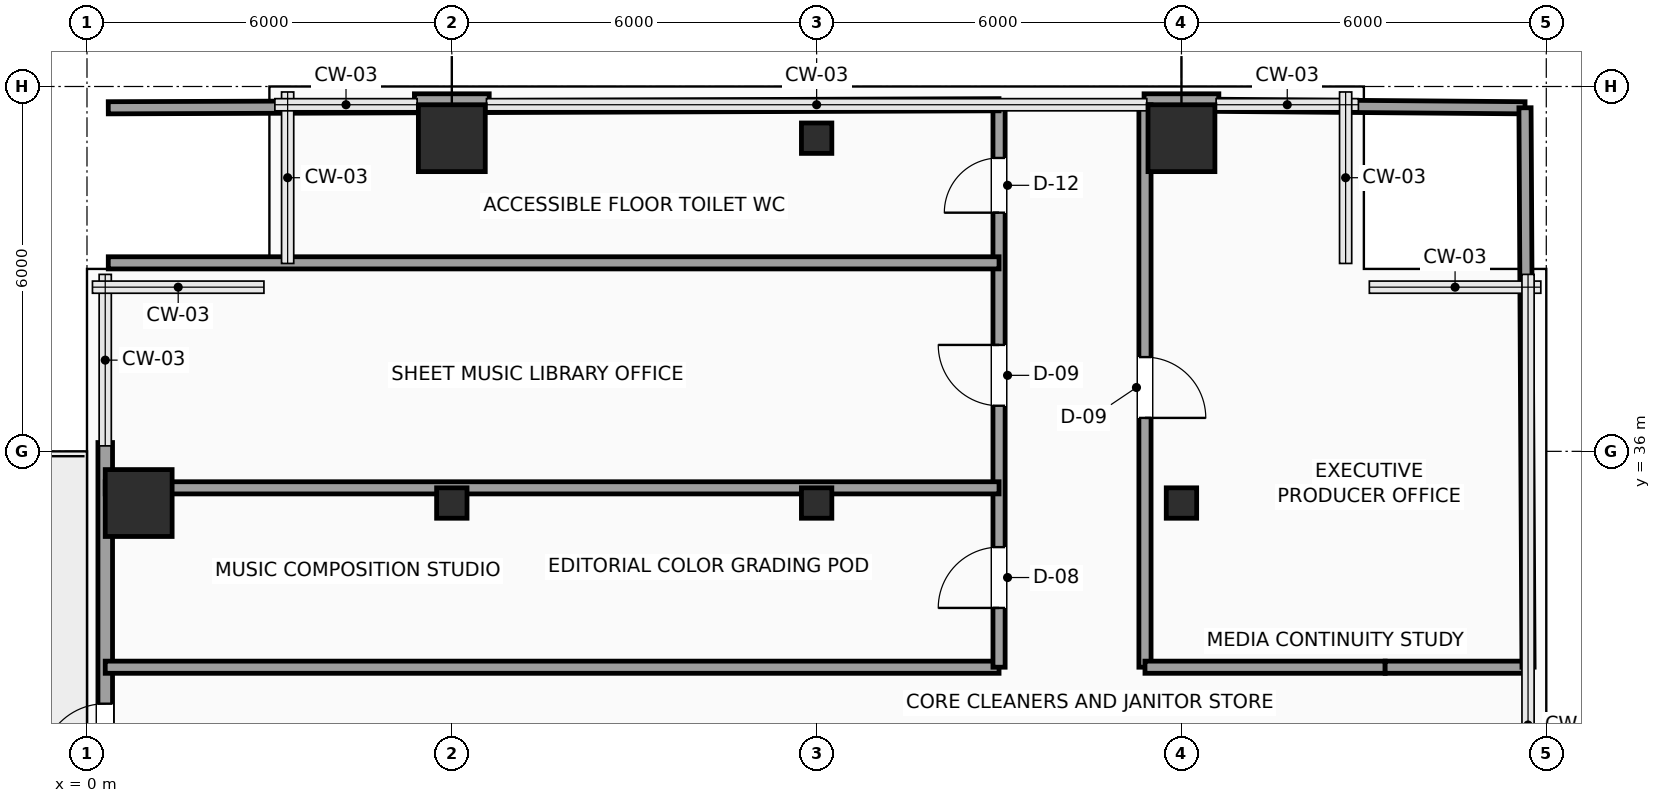
"""IFC4 building model, lengths in metres.
Left out: names, types, materials, properties, quantities, classifications, styles, units other than length and angle.
Written with IfcOpenShell. Run it as: python <this file> out.ifc"""

import sys

from ifc_helpers import new_model, si_unit, direction, frame, frame_2d, origin, origin_2d, place, context, subcontext, project, spatial, rectangle, hollow_rectangle, extrude, element, fill, save


model = new_model("IFC4")
c1 = context("Model", 3, precision=1e-05, world=origin(), true_north=direction((0.0, 1.0)))
c2 = subcontext(c1, "Body", "Model", "MODEL_VIEW")
j1 = project(units=[si_unit("LENGTHUNIT", "METRE"), si_unit("PLANEANGLEUNIT", "RADIAN")], contexts=[c1])
p1 = place(None, origin())
s1 = spatial("IfcSite", under=j1, at=p1, CompositionType="ELEMENT")
p2 = place(p1, origin())
s2 = spatial("IfcBuilding", under=s1, at=p2, CompositionType="ELEMENT")
p3 = place(p2, frame((0.0, 0.0, 119.4)))
s3 = spatial("IfcBuildingStorey", under=s2, at=p3, CompositionType="ELEMENT", Elevation=119.4)
p4 = place(p3, frame((0.85, 35.15, 0.0), z_axis=(0.0, 0.0, 1.0), x_axis=(1.0, 0.0, 0.0)))
e1 = element("IfcColumn", 1, at=p4, inside=s3, PredefinedType="COLUMN", context=c2, shape_type="SweptSolid", body=[
    extrude(rectangle(XDim=1.1, YDim=1.1, at=origin_2d()), origin(), (0.0, 0.0, 1.0), 3.75),
])
p5 = place(p3, frame((6.0, 35.15, 0.0), z_axis=(0.0, 0.0, 1.0), x_axis=(1.0, 0.0, 0.0)))
e2 = element("IfcColumn", 2, at=p5, inside=s3, PredefinedType="COLUMN", context=c2, shape_type="SweptSolid", body=[
    extrude(hollow_rectangle(XDim=0.5, YDim=0.5, WallThickness=0.025, InnerFilletRadius=0.025, OuterFilletRadius=0.04, at=origin_2d()), origin(), (0.0, 0.0, 1.0), 3.75),
])
p6 = place(p3, frame((6.0, 41.15, 0.0), z_axis=(0.0, 0.0, 1.0), x_axis=(1.0, 0.0, 0.0)))
e3 = element("IfcColumn", 3, at=p6, inside=s3, PredefinedType="COLUMN", context=c2, shape_type="SweptSolid", body=[
    extrude(rectangle(XDim=1.1, YDim=1.1, at=origin_2d()), origin(), (0.0, 0.0, 1.0), 3.75),
])
for number, where, z_axis, x_axis in (
    (4, (12.0, 35.15, 0.0), (0.0, 0.0, 1.0), (1.0, 0.0, 0.0)),
    (5, (12.0, 41.15, 0.0), (0.0, 0.0, 1.0), (1.0, 0.0, 0.0)),
    (6, (18.0, 35.15, 0.0), (0.0, 0.0, 1.0), (1.0, 0.0, 0.0)),
):
    element("IfcColumn", number, at=place(p3, frame(where, z_axis=z_axis, x_axis=x_axis)), inside=s3, PredefinedType="COLUMN", context=c2, shape_type="SweptSolid", body=[
        extrude(hollow_rectangle(XDim=0.5, YDim=0.5, WallThickness=0.025, InnerFilletRadius=0.025, OuterFilletRadius=0.04, at=origin_2d()), origin(), (0.0, 0.0, 1.0), 3.75),
    ])
p7 = place(p3, frame((18.0, 41.15, 0.0), z_axis=(0.0, 0.0, 1.0), x_axis=(1.0, 0.0, 0.0)))
e7 = element("IfcColumn", 7, at=p7, inside=s3, PredefinedType="COLUMN", context=c2, shape_type="SweptSolid", body=[
    extrude(rectangle(XDim=1.1, YDim=1.1, at=origin_2d()), origin(), (0.0, 0.0, 1.0), 3.75),
])
p8 = place(p3, frame((0.3, 26.855, 0.0), z_axis=(0.0, 0.0, 1.0), x_axis=(0.0, 1.0, 0.0)))
e8 = element("IfcWall", 8, at=p8, inside=s3, PredefinedType="SOLIDWALL", context=c2, shape_type="SweptSolid", body=[
    extrude(rectangle(XDim=9.29, YDim=0.24, at=frame_2d((4.645, 0.0))), origin(), (0.0, 0.0, 1.0), 3.525),
])
p9 = place(p8, frame((3.945, 0.0, 0.0)))
e9 = element("IfcOpeningElement", 9, at=p9, cuts=e8, PredefinedType="OPENING", context=c2, shape_type="SweptSolid", body=[
    extrude(rectangle(XDim=1.05, YDim=2.2, at=frame_2d((0.525, 1.1))), frame((0.0, 0.13, 0.0), z_axis=(0.0, -1.0, 0.0), x_axis=(1.0, 0.0, 0.0)), (0.0, 0.0, 1.0), 0.26),
])
for number, where, z_axis, x_axis in (
    (10, (5.385, 41.76, 0.0), (0.0, 0.0, 1.0), (1.0, 0.0, 0.0)),
    (11, (17.385, 41.76, 0.0), (0.0, 0.0, 1.0), (1.0, 0.0, 0.0)),
):
    element("IfcWall", number, at=place(p3, frame(where, z_axis=z_axis, x_axis=x_axis)), inside=s3, PredefinedType="SOLIDWALL", context=c2, shape_type="SweptSolid", body=[
        extrude(rectangle(XDim=1.23, YDim=0.24, at=frame_2d((0.615, 0.0))), origin(), (0.0, 0.0, 1.0), 3.525),
    ])
p10 = place(p3, frame((0.3, 32.45, 0.0), z_axis=(0.0, 0.0, 1.0), x_axis=(1.0, 0.0, 0.0)))
e12 = element("IfcWall", 12, at=p10, inside=s3, PredefinedType="SOLIDWALL", context=c2, shape_type="SweptSolid", body=[
    extrude(rectangle(XDim=14.7, YDim=0.2, at=frame_2d((7.35, 0.0))), origin(), (0.0, 0.0, 1.0), 3.525),
])
p11 = place(p3, frame((15.0, 32.45, 0.0), z_axis=(0.0, 0.0, 1.0), x_axis=(0.0, 1.0, 0.0)))
e13 = element("IfcWall", 13, at=p11, inside=s3, PredefinedType="SOLIDWALL", context=c2, shape_type="SweptSolid", body=[
    extrude(rectangle(XDim=9.25, YDim=0.2, at=frame_2d((4.625, 0.0))), origin(), (0.0, 0.0, 1.0), 3.525),
])
p12 = place(p11, frame((0.975, 0.0, 0.0)))
e14 = element("IfcOpeningElement", 14, at=p12, cuts=e13, PredefinedType="OPENING", context=c2, shape_type="SweptSolid", body=[
    extrude(rectangle(XDim=1.0, YDim=2.2, at=frame_2d((0.5, 1.1))), frame((0.0, 0.11, 0.0), z_axis=(0.0, -1.0, 0.0), x_axis=(1.0, 0.0, 0.0)), (0.0, 0.0, 1.0), 0.22),
])
p13 = place(p11, frame((4.3, 0.0, 0.0)))
e15 = element("IfcOpeningElement", 15, at=p13, cuts=e13, PredefinedType="OPENING", context=c2, shape_type="SweptSolid", body=[
    extrude(rectangle(XDim=1.0, YDim=2.2, at=frame_2d((0.5, 1.1))), frame((0.0, 0.11, 0.0), z_axis=(0.0, -1.0, 0.0), x_axis=(1.0, 0.0, 0.0)), (0.0, 0.0, 1.0), 0.22),
])
p14 = place(p11, frame((7.475, 0.0, 0.0)))
e16 = element("IfcOpeningElement", 16, at=p14, cuts=e13, PredefinedType="OPENING", context=c2, shape_type="SweptSolid", body=[
    extrude(rectangle(XDim=0.9, YDim=2.1, at=frame_2d((0.45, 1.05))), frame((0.0, 0.11, 0.0), z_axis=(0.0, -1.0, 0.0), x_axis=(1.0, 0.0, 0.0)), (0.0, 0.0, 1.0), 0.22),
])
p15 = place(p3, frame((17.4, 41.7, 0.0), z_axis=(0.0, 0.0, 1.0), x_axis=(0.0, -1.0, 0.0)))
e17 = element("IfcWall", 17, at=p15, inside=s3, PredefinedType="SOLIDWALL", context=c2, shape_type="SweptSolid", body=[
    extrude(rectangle(XDim=9.25, YDim=0.2, at=frame_2d((4.625, 0.0))), origin(), (0.0, 0.0, 1.0), 3.525),
])
p16 = place(p15, frame((4.15, 0.0, 0.0)))
e18 = element("IfcOpeningElement", 18, at=p16, cuts=e17, PredefinedType="OPENING", context=c2, shape_type="SweptSolid", body=[
    extrude(rectangle(XDim=1.0, YDim=2.2, at=frame_2d((0.5, 1.1))), frame((0.0, 0.11, 0.0), z_axis=(0.0, -1.0, 0.0), x_axis=(1.0, 0.0, 0.0)), (0.0, 0.0, 1.0), 0.22),
])
p17 = place(p3, frame((17.4, 32.45, 0.0), z_axis=(0.0, 0.0, 1.0), x_axis=(1.0, 0.0, 0.0)))
e19 = element("IfcWall", 19, at=p17, inside=s3, PredefinedType="SOLIDWALL", context=c2, shape_type="SweptSolid", body=[
    extrude(rectangle(XDim=3.95, YDim=0.2, at=frame_2d((1.975, 0.0))), origin(), (0.0, 0.0, 1.0), 3.525),
])
p18 = place(p3, frame((21.35, 32.45, 0.0), z_axis=(0.0, 0.0, 1.0), x_axis=(1.0, 0.0, 0.0)))
e20 = element("IfcWall", 20, at=p18, inside=s3, PredefinedType="SOLIDWALL", context=c2, shape_type="SweptSolid", body=[
    extrude(rectangle(XDim=2.35, YDim=0.2, at=frame_2d((1.175, 0.0))), origin(), (0.0, 0.0, 1.0), 3.525),
])
p19 = place(p3, frame((0.3, 35.4, 0.0), z_axis=(0.0, 0.0, 1.0), x_axis=(1.0, 0.0, 0.0)))
e21 = element("IfcWall", 21, at=p19, inside=s3, PredefinedType="PARTITIONING", context=c2, shape_type="SweptSolid", body=[
    extrude(rectangle(XDim=14.7, YDim=0.2, at=frame_2d((7.35, 0.0))), origin(), (0.0, 0.0, 1.0), 3.017),
])
p20 = place(p3, frame((0.35, 39.1, 0.0), z_axis=(0.0, 0.0, 1.0), x_axis=(1.0, 0.0, 0.0)))
e22 = element("IfcWall", 22, at=p20, inside=s3, PredefinedType="PARTITIONING", context=c2, shape_type="SweptSolid", body=[
    extrude(rectangle(XDim=14.65, YDim=0.2, at=frame_2d((7.325, 0.0))), origin(), (0.0, 0.0, 1.0), 3.525),
])
p21 = place(p3, frame((0.35, 41.65, 0.0), z_axis=(0.0, 0.0, 1.0), x_axis=(0.999994073761, 0.003442737683, 0.0)))
e23 = element("IfcWall", 23, at=p21, inside=s3, PredefinedType="PARTITIONING", context=c2, shape_type="SweptSolid", body=[
    extrude(rectangle(XDim=5.035, YDim=0.2, at=frame_2d((2.518, 0.0))), origin(), (0.0, 0.0, 1.0), 3.525),
])
p22 = place(p3, frame((6.615, 41.671, 0.0), z_axis=(0.0, 0.0, 1.0), x_axis=(0.999994197557, 0.003406589638, 0.0)))
e24 = element("IfcWall", 24, at=p22, inside=s3, PredefinedType="PARTITIONING", context=c2, shape_type="SweptSolid", body=[
    extrude(rectangle(XDim=8.385, YDim=0.2, at=frame_2d((4.192, 0.0))), origin(), (0.0, 0.0, 1.0), 3.525),
])
p23 = place(p3, frame((18.615, 41.69, 0.0), z_axis=(0.0, 0.0, 1.0), x_axis=(0.99996799533, -0.008000519771, 0.0)))
e25 = element("IfcWall", 25, at=p23, inside=s3, PredefinedType="PARTITIONING", context=c2, shape_type="SweptSolid", body=[
    extrude(rectangle(XDim=5.035, YDim=0.2, at=frame_2d((2.518, 0.0))), origin(), (0.0, 0.0, 1.0), 3.525),
])
p24 = place(p3, frame((23.7, 32.45, 0.0), z_axis=(0.0, 0.0, 1.0), x_axis=(-0.005440038388, 0.999985202882, 0.0)))
e26 = element("IfcWall", 26, at=p24, inside=s3, PredefinedType="PARTITIONING", context=c2, shape_type="SweptSolid", body=[
    extrude(rectangle(XDim=9.2, YDim=0.2, at=frame_2d((4.6, 0.0))), origin(), (0.0, 0.0, 1.0), 3.525),
])
p25 = place(p9, origin())
e27 = element("IfcDoor", 27, at=p25, inside=s3, OperationType="SINGLE_SWING_LEFT", PredefinedType="DOOR", context=c2, shape_type="SweptSolid", body=[
    extrude(rectangle(XDim=1.05, YDim=2.2, at=frame_2d((0.525, 1.1))), frame((0.0, 0.025, 0.0), z_axis=(0.0, -1.0, 0.0), x_axis=(1.0, 0.0, 0.0)), (0.0, 0.0, 1.0), 0.05),
])
fill(e9, e27)
p26 = place(p12, origin())
e28 = element("IfcDoor", 28, at=p26, inside=s3, OperationType="SINGLE_SWING_LEFT", PredefinedType="DOOR", context=c2, shape_type="SweptSolid", body=[
    extrude(rectangle(XDim=1.0, YDim=2.2, at=frame_2d((0.5, 1.1))), frame((0.0, 0.025, 0.0), z_axis=(0.0, -1.0, 0.0), x_axis=(1.0, 0.0, 0.0)), (0.0, 0.0, 1.0), 0.05),
])
fill(e14, e28)
p27 = place(p13, origin())
e29 = element("IfcDoor", 29, at=p27, inside=s3, OperationType="SINGLE_SWING_RIGHT", PredefinedType="DOOR", context=c2, shape_type="SweptSolid", body=[
    extrude(rectangle(XDim=1.0, YDim=2.2, at=frame_2d((0.5, 1.1))), frame((0.0, 0.025, 0.0), z_axis=(0.0, -1.0, 0.0), x_axis=(1.0, 0.0, 0.0)), (0.0, 0.0, 1.0), 0.05),
])
fill(e15, e29)
p28 = place(p14, origin())
e30 = element("IfcDoor", 30, at=p28, inside=s3, OperationType="SINGLE_SWING_LEFT", PredefinedType="DOOR", context=c2, shape_type="SweptSolid", body=[
    extrude(rectangle(XDim=0.9, YDim=2.1, at=frame_2d((0.45, 1.05))), frame((0.0, 0.025, 0.0), z_axis=(0.0, -1.0, 0.0), x_axis=(1.0, 0.0, 0.0)), (0.0, 0.0, 1.0), 0.05),
])
fill(e16, e30)
p29 = place(p16, origin())
e31 = element("IfcDoor", 31, at=p29, inside=s3, OperationType="SINGLE_SWING_RIGHT", PredefinedType="DOOR", context=c2, shape_type="SweptSolid", body=[
    extrude(rectangle(XDim=1.0, YDim=2.2, at=frame_2d((0.5, 1.1))), frame((0.0, 0.025, 0.0), z_axis=(0.0, -1.0, 0.0), x_axis=(1.0, 0.0, 0.0)), (0.0, 0.0, 1.0), 0.05),
])
fill(e18, e31)
save(model, sys.argv[1])
